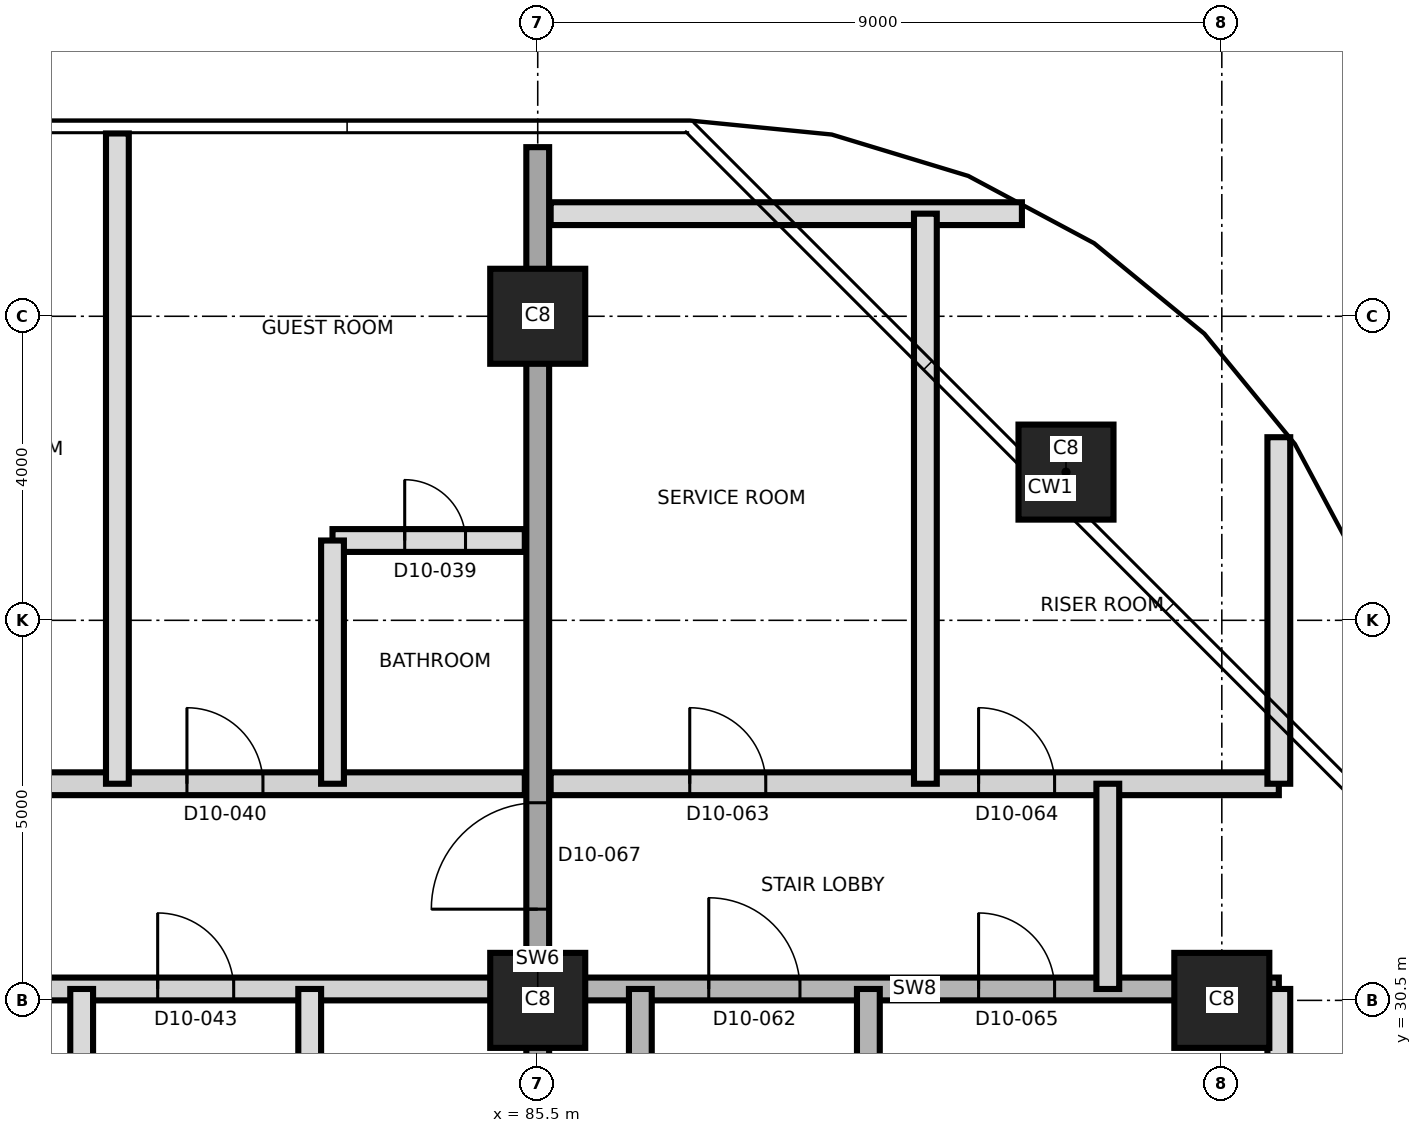
"""IFC4 building model, lengths in metres.
Left out: names, types, materials, properties, quantities, classifications, styles, units other than length and angle.
Written with IfcOpenShell. Run it as: python <this file> out.ifc"""

import sys

from ifc_helpers import new_model, si_unit, direction, frame, frame_2d, origin, origin_2d, place, context, subcontext, project, spatial, rectangle, extrude, element, fill, save


model = new_model("IFC4")
c1 = context("Model", 3, precision=1e-05, world=origin(), true_north=direction((0.0, 1.0)))
c2 = subcontext(c1, "Body", "Model", "MODEL_VIEW")
j1 = project(units=[si_unit("LENGTHUNIT", "METRE"), si_unit("PLANEANGLEUNIT", "RADIAN")], contexts=[c1])
p1 = place(None, origin())
s1 = spatial("IfcSite", under=j1, at=p1, CompositionType="ELEMENT")
p2 = place(p1, origin())
s2 = spatial("IfcBuilding", under=s1, at=p2, CompositionType="ELEMENT")
p3 = place(p2, frame((0.0, 0.0, 116.7)))
s3 = spatial("IfcBuildingStorey", under=s2, at=p3, CompositionType="ELEMENT", Elevation=116.7)
for number, where, z_axis, x_axis in (
    (1, (85.5, 30.5, 0.0), (0.0, 0.0, 1.0), (1.0, 0.0, 0.0)),
    (2, (94.5, 30.5, 0.0), (0.0, 0.0, 1.0), (1.0, 0.0, 0.0)),
    (3, (92.45, 37.45, 0.0), (0.0, 0.0, 1.0), (1.0, 0.0, 0.0)),
    (4, (85.5, 39.5, 0.0), (0.0, 0.0, 1.0), (1.0, 0.0, 0.0)),
):
    element("IfcColumn", number, at=place(p3, frame(where, z_axis=z_axis, x_axis=x_axis)), inside=s3, PredefinedType="COLUMN", context=c2, shape_type="SweptSolid", body=[
        extrude(rectangle(XDim=1.25, YDim=1.25, at=origin_2d()), origin(), (0.0, 0.0, 1.0), 3.7),
    ])
p4 = place(p3, frame((85.5, 19.275, 0.0), z_axis=(0.0, 0.0, 1.0), x_axis=(0.0, 1.0, 0.0)))
e5 = element("IfcWall", 5, at=p4, inside=s3, PredefinedType="SHEAR", context=c2, shape_type="SweptSolid", body=[
    extrude(rectangle(XDim=22.45, YDim=0.3, at=frame_2d((11.225, 0.0))), origin(), (0.0, 0.0, 1.0), 3.7),
])
p5 = place(p4, frame((12.425, 0.0, 0.0)))
e6 = element("IfcOpeningElement", 6, at=p5, cuts=e5, PredefinedType="OPENING", context=c2, shape_type="SweptSolid", body=[
    extrude(rectangle(XDim=1.4, YDim=2.1, at=frame_2d((0.7, 1.05))), frame((0.0, 0.16, 0.0), z_axis=(0.0, -1.0, 0.0), x_axis=(1.0, 0.0, 0.0)), (0.0, 0.0, 1.0), 0.32),
])
p6 = place(p3, frame((58.8, 30.65, 0.0), z_axis=(0.0, 0.0, 1.0), x_axis=(1.0, 0.0, 0.0)))
e7 = element("IfcWall", 7, at=p6, inside=s3, PredefinedType="PARTITIONING", context=c2, shape_type="SweptSolid", body=[
    extrude(rectangle(XDim=26.53, YDim=0.3, at=frame_2d((13.265, 0.0))), origin(), (0.0, 0.0, 1.0), 3.4),
])
p7 = place(p6, frame((0.835, 0.0, 0.0)))
e8 = element("IfcOpeningElement", 8, at=p7, cuts=e7, PredefinedType="OPENING", context=c2, shape_type="SweptSolid", body=[
    extrude(rectangle(XDim=1.2, YDim=2.1, at=frame_2d((0.6, 1.05))), frame((0.0, 0.16, 0.0), z_axis=(0.0, -1.0, 0.0), x_axis=(1.0, 0.0, 0.0)), (0.0, 0.0, 1.0), 0.32),
])
p8 = place(p6, frame((4.085, 0.0, 0.0)))
e9 = element("IfcOpeningElement", 9, at=p8, cuts=e7, PredefinedType="OPENING", context=c2, shape_type="SweptSolid", body=[
    extrude(rectangle(XDim=1.0, YDim=2.1, at=frame_2d((0.5, 1.05))), frame((0.0, 0.16, 0.0), z_axis=(0.0, -1.0, 0.0), x_axis=(1.0, 0.0, 0.0)), (0.0, 0.0, 1.0), 0.32),
])
p9 = place(p6, frame((12.7, 0.0, 0.0)))
e10 = element("IfcOpeningElement", 10, at=p9, cuts=e7, PredefinedType="OPENING", context=c2, shape_type="SweptSolid", body=[
    extrude(rectangle(XDim=1.0, YDim=2.4, at=frame_2d((0.5, 1.2))), frame((0.0, 0.16, 0.0), z_axis=(0.0, -1.0, 0.0), x_axis=(1.0, 0.0, 0.0)), (0.0, 0.0, 1.0), 0.32),
])
p10 = place(p6, frame((21.7, 0.0, 0.0)))
e11 = element("IfcOpeningElement", 11, at=p10, cuts=e7, PredefinedType="OPENING", context=c2, shape_type="SweptSolid", body=[
    extrude(rectangle(XDim=1.0, YDim=2.4, at=frame_2d((0.5, 1.2))), frame((0.0, 0.16, 0.0), z_axis=(0.0, -1.0, 0.0), x_axis=(1.0, 0.0, 0.0)), (0.0, 0.0, 1.0), 0.32),
])
p11 = place(p3, frame((85.67, 30.65, 0.0), z_axis=(0.0, 0.0, 1.0), x_axis=(1.0, 0.0, 0.0)))
e12 = element("IfcWall", 12, at=p11, inside=s3, PredefinedType="SHEAR", context=c2, shape_type="SweptSolid", body=[
    extrude(rectangle(XDim=9.58, YDim=0.3, at=frame_2d((4.79, 0.0))), origin(), (0.0, 0.0, 1.0), 3.4),
])
p12 = place(p11, frame((2.08, 0.0, 0.0)))
e13 = element("IfcOpeningElement", 13, at=p12, cuts=e12, PredefinedType="OPENING", context=c2, shape_type="SweptSolid", body=[
    extrude(rectangle(XDim=1.2, YDim=2.1, at=frame_2d((0.6, 1.05))), frame((0.0, 0.16, 0.0), z_axis=(0.0, -1.0, 0.0), x_axis=(1.0, 0.0, 0.0)), (0.0, 0.0, 1.0), 0.32),
])
p13 = place(p11, frame((5.63, 0.0, 0.0)))
e14 = element("IfcOpeningElement", 14, at=p13, cuts=e12, PredefinedType="OPENING", context=c2, shape_type="SweptSolid", body=[
    extrude(rectangle(XDim=1.0, YDim=2.1, at=frame_2d((0.5, 1.05))), frame((0.0, 0.16, 0.0), z_axis=(0.0, -1.0, 0.0), x_axis=(1.0, 0.0, 0.0)), (0.0, 0.0, 1.0), 0.32),
])
p14 = place(p3, frame((58.8, 33.35, 0.0), z_axis=(0.0, 0.0, 1.0), x_axis=(1.0, 0.0, 0.0)))
e15 = element("IfcWall", 15, at=p14, inside=s3, PredefinedType="PARTITIONING", context=c2, shape_type="SweptSolid", body=[
    extrude(rectangle(XDim=26.53, YDim=0.3, at=frame_2d((13.265, 0.0))), origin(), (0.0, 0.0, 1.0), 3.4),
])
p15 = place(p14, frame((0.85, 0.0, 0.0)))
e16 = element("IfcOpeningElement", 16, at=p15, cuts=e15, PredefinedType="OPENING", context=c2, shape_type="SweptSolid", body=[
    extrude(rectangle(XDim=1.0, YDim=2.1, at=frame_2d((0.5, 1.05))), frame((0.0, 0.16, 0.0), z_axis=(0.0, -1.0, 0.0), x_axis=(1.0, 0.0, 0.0)), (0.0, 0.0, 1.0), 0.32),
])
p16 = place(p14, frame((6.7, 0.0, 0.0)))
e17 = element("IfcOpeningElement", 17, at=p16, cuts=e15, PredefinedType="OPENING", context=c2, shape_type="SweptSolid", body=[
    extrude(rectangle(XDim=1.0, YDim=2.1, at=frame_2d((0.5, 1.05))), frame((0.0, 0.16, 0.0), z_axis=(0.0, -1.0, 0.0), x_axis=(1.0, 0.0, 0.0)), (0.0, 0.0, 1.0), 0.32),
])
p17 = place(p14, frame((9.55, 0.0, 0.0)))
e18 = element("IfcOpeningElement", 18, at=p17, cuts=e15, PredefinedType="OPENING", context=c2, shape_type="SweptSolid", body=[
    extrude(rectangle(XDim=1.0, YDim=2.1, at=frame_2d((0.5, 1.05))), frame((0.0, 0.16, 0.0), z_axis=(0.0, -1.0, 0.0), x_axis=(1.0, 0.0, 0.0)), (0.0, 0.0, 1.0), 0.32),
])
p18 = place(p14, frame((15.4, 0.0, 0.0)))
e19 = element("IfcOpeningElement", 19, at=p18, cuts=e15, PredefinedType="OPENING", context=c2, shape_type="SweptSolid", body=[
    extrude(rectangle(XDim=1.0, YDim=2.1, at=frame_2d((0.5, 1.05))), frame((0.0, 0.16, 0.0), z_axis=(0.0, -1.0, 0.0), x_axis=(1.0, 0.0, 0.0)), (0.0, 0.0, 1.0), 0.32),
])
p19 = place(p14, frame((18.835, 0.0, 0.0)))
e20 = element("IfcOpeningElement", 20, at=p19, cuts=e15, PredefinedType="OPENING", context=c2, shape_type="SweptSolid", body=[
    extrude(rectangle(XDim=1.2, YDim=2.1, at=frame_2d((0.6, 1.05))), frame((0.0, 0.16, 0.0), z_axis=(0.0, -1.0, 0.0), x_axis=(1.0, 0.0, 0.0)), (0.0, 0.0, 1.0), 0.32),
])
p20 = place(p14, frame((22.085, 0.0, 0.0)))
e21 = element("IfcOpeningElement", 21, at=p20, cuts=e15, PredefinedType="OPENING", context=c2, shape_type="SweptSolid", body=[
    extrude(rectangle(XDim=1.0, YDim=2.1, at=frame_2d((0.5, 1.05))), frame((0.0, 0.16, 0.0), z_axis=(0.0, -1.0, 0.0), x_axis=(1.0, 0.0, 0.0)), (0.0, 0.0, 1.0), 0.32),
])
p21 = place(p3, frame((85.67, 33.35, 0.0), z_axis=(0.0, 0.0, 1.0), x_axis=(1.0, 0.0, 0.0)))
e22 = element("IfcWall", 22, at=p21, inside=s3, PredefinedType="PARTITIONING", context=c2, shape_type="SweptSolid", body=[
    extrude(rectangle(XDim=9.58, YDim=0.3, at=frame_2d((4.79, 0.0))), origin(), (0.0, 0.0, 1.0), 3.4),
])
p22 = place(p21, frame((1.83, 0.0, 0.0)))
e23 = element("IfcOpeningElement", 23, at=p22, cuts=e22, PredefinedType="OPENING", context=c2, shape_type="SweptSolid", body=[
    extrude(rectangle(XDim=1.0, YDim=2.1, at=frame_2d((0.5, 1.05))), frame((0.0, 0.16, 0.0), z_axis=(0.0, -1.0, 0.0), x_axis=(1.0, 0.0, 0.0)), (0.0, 0.0, 1.0), 0.32),
])
p23 = place(p21, frame((5.63, 0.0, 0.0)))
e24 = element("IfcOpeningElement", 24, at=p23, cuts=e22, PredefinedType="OPENING", context=c2, shape_type="SweptSolid", body=[
    extrude(rectangle(XDim=1.0, YDim=2.1, at=frame_2d((0.5, 1.05))), frame((0.0, 0.16, 0.0), z_axis=(0.0, -1.0, 0.0), x_axis=(1.0, 0.0, 0.0)), (0.0, 0.0, 1.0), 0.32),
])
p24 = place(p3, frame((82.8, 36.55, 0.0), z_axis=(0.0, 0.0, 1.0), x_axis=(1.0, 0.0, 0.0)))
e25 = element("IfcWall", 25, at=p24, inside=s3, PredefinedType="PARTITIONING", context=c2, shape_type="SweptSolid", body=[
    extrude(rectangle(XDim=2.53, YDim=0.3, at=frame_2d((1.265, 0.0))), origin(), (0.0, 0.0, 1.0), 3.4),
])
p25 = place(p24, frame((0.95, 0.0, 0.0)))
e26 = element("IfcOpeningElement", 26, at=p25, cuts=e25, PredefinedType="OPENING", context=c2, shape_type="SweptSolid", body=[
    extrude(rectangle(XDim=0.8, YDim=2.1, at=frame_2d((0.4, 1.05))), frame((0.0, 0.16, 0.0), z_axis=(0.0, -1.0, 0.0), x_axis=(1.0, 0.0, 0.0)), (0.0, 0.0, 1.0), 0.32),
])
p26 = place(p3, frame((85.67, 40.85, 0.0), z_axis=(0.0, 0.0, 1.0), x_axis=(1.0, 0.0, 0.0)))
e27 = element("IfcWall", 27, at=p26, inside=s3, PredefinedType="PARTITIONING", context=c2, shape_type="SweptSolid", body=[
    extrude(rectangle(XDim=6.2, YDim=0.3, at=frame_2d((3.1, 0.0))), origin(), (0.0, 0.0, 1.0), 3.4),
])
p27 = place(p3, frame((79.5, 27.35, 0.0), z_axis=(0.0, 0.0, 1.0), x_axis=(0.0, 1.0, 0.0)))
e28 = element("IfcWall", 28, at=p27, inside=s3, PredefinedType="PARTITIONING", context=c2, shape_type="SweptSolid", body=[
    extrude(rectangle(XDim=3.3, YDim=0.3, at=frame_2d((1.65, 0.0))), origin(), (0.0, 0.0, 1.0), 3.4),
])
p28 = place(p3, frame((79.97, 33.35, 0.0), z_axis=(0.0, 0.0, 1.0), x_axis=(0.0, 1.0, 0.0)))
e29 = element("IfcWall", 29, at=p28, inside=s3, PredefinedType="PARTITIONING", context=c2, shape_type="SweptSolid", body=[
    extrude(rectangle(XDim=8.555, YDim=0.3, at=frame_2d((4.277, 0.0))), origin(), (0.0, 0.0, 1.0), 3.4),
])
p29 = place(p3, frame((82.5, 27.35, 0.0), z_axis=(0.0, 0.0, 1.0), x_axis=(0.0, 1.0, 0.0)))
e30 = element("IfcWall", 30, at=p29, inside=s3, PredefinedType="PARTITIONING", context=c2, shape_type="SweptSolid", body=[
    extrude(rectangle(XDim=3.3, YDim=0.3, at=frame_2d((1.65, 0.0))), origin(), (0.0, 0.0, 1.0), 3.4),
])
p30 = place(p3, frame((82.8, 33.35, 0.0), z_axis=(0.0, 0.0, 1.0), x_axis=(0.0, 1.0, 0.0)))
e31 = element("IfcWall", 31, at=p30, inside=s3, PredefinedType="PARTITIONING", context=c2, shape_type="SweptSolid", body=[
    extrude(rectangle(XDim=3.2, YDim=0.3, at=frame_2d((1.6, 0.0))), origin(), (0.0, 0.0, 1.0), 3.4),
])
for number, where, z_axis, x_axis in (
    (32, (86.85, 21.8, 0.0), (0.0, 0.0, 1.0), (0.0, 1.0, 0.0)),
    (33, (89.85, 21.8, 0.0), (0.0, 0.0, 1.0), (0.0, 1.0, 0.0)),
):
    element("IfcWall", number, at=place(p3, frame(where, z_axis=z_axis, x_axis=x_axis)), inside=s3, PredefinedType="SHEAR", context=c2, shape_type="SweptSolid", body=[
        extrude(rectangle(XDim=8.85, YDim=0.3, at=frame_2d((4.425, 0.0))), origin(), (0.0, 0.0, 1.0), 3.4),
    ])
p31 = place(p3, frame((90.6, 33.35, 0.0), z_axis=(0.0, 0.0, 1.0), x_axis=(0.0, 1.0, 0.0)))
e34 = element("IfcWall", 34, at=p31, inside=s3, PredefinedType="PARTITIONING", context=c2, shape_type="SweptSolid", body=[
    extrude(rectangle(XDim=7.5, YDim=0.3, at=frame_2d((3.75, 0.0))), origin(), (0.0, 0.0, 1.0), 3.4),
])
p32 = place(p3, frame((93.0, 30.65, 0.0), z_axis=(0.0, 0.0, 1.0), x_axis=(0.0, 1.0, 0.0)))
e35 = element("IfcWall", 35, at=p32, inside=s3, PredefinedType="PARTITIONING", context=c2, shape_type="SweptSolid", body=[
    extrude(rectangle(XDim=2.7, YDim=0.3, at=frame_2d((1.35, 0.0))), origin(), (0.0, 0.0, 1.0), 3.4),
])
p33 = place(p3, frame((95.25, 23.091, 0.0), z_axis=(0.0, 0.0, 1.0), x_axis=(0.0, 1.0, 0.0)))
e36 = element("IfcWall", 36, at=p33, inside=s3, PredefinedType="PARTITIONING", context=c2, shape_type="SweptSolid", body=[
    extrude(rectangle(XDim=7.559, YDim=0.3, at=frame_2d((3.779, 0.0))), origin(), (0.0, 0.0, 1.0), 3.4),
])
p34 = place(p3, frame((95.25, 33.35, 0.0), z_axis=(0.0, 0.0, 1.0), x_axis=(0.0, 1.0, 0.0)))
e37 = element("IfcWall", 37, at=p34, inside=s3, PredefinedType="PARTITIONING", context=c2, shape_type="SweptSolid", body=[
    extrude(rectangle(XDim=4.559, YDim=0.3, at=frame_2d((2.279, 0.0))), origin(), (0.0, 0.0, 1.0), 3.4),
])
p35 = place(p25, origin())
e38 = element("IfcDoor", 38, at=p35, inside=s3, OperationType="SINGLE_SWING_RIGHT", PredefinedType="DOOR", context=c2, shape_type="SweptSolid", body=[
    extrude(rectangle(XDim=0.8, YDim=2.1, at=frame_2d((0.4, 1.05))), frame((0.0, 0.025, 0.0), z_axis=(0.0, -1.0, 0.0), x_axis=(1.0, 0.0, 0.0)), (0.0, 0.0, 1.0), 0.05),
])
fill(e26, e38)
p36 = place(p20, origin())
e39 = element("IfcDoor", 39, at=p36, inside=s3, OperationType="SINGLE_SWING_LEFT", PredefinedType="DOOR", context=c2, shape_type="SweptSolid", body=[
    extrude(rectangle(XDim=1.0, YDim=2.1, at=frame_2d((0.5, 1.05))), frame((0.0, 0.025, 0.0), z_axis=(0.0, -1.0, 0.0), x_axis=(1.0, 0.0, 0.0)), (0.0, 0.0, 1.0), 0.05),
])
fill(e21, e39)
p37 = place(p10, origin())
e40 = element("IfcDoor", 40, at=p37, inside=s3, OperationType="SINGLE_SWING_LEFT", PredefinedType="DOOR", context=c2, shape_type="SweptSolid", body=[
    extrude(rectangle(XDim=1.0, YDim=2.4, at=frame_2d((0.5, 1.2))), frame((0.0, 0.025, 0.0), z_axis=(0.0, -1.0, 0.0), x_axis=(1.0, 0.0, 0.0)), (0.0, 0.0, 1.0), 0.05),
])
fill(e11, e40)
p38 = place(p12, origin())
e41 = element("IfcDoor", 41, at=p38, inside=s3, OperationType="SINGLE_SWING_LEFT", PredefinedType="DOOR", context=c2, shape_type="SweptSolid", body=[
    extrude(rectangle(XDim=1.2, YDim=2.1, at=frame_2d((0.6, 1.05))), frame((0.0, 0.025, 0.0), z_axis=(0.0, -1.0, 0.0), x_axis=(1.0, 0.0, 0.0)), (0.0, 0.0, 1.0), 0.05),
])
fill(e13, e41)
p39 = place(p22, origin())
e42 = element("IfcDoor", 42, at=p39, inside=s3, OperationType="SINGLE_SWING_LEFT", PredefinedType="DOOR", context=c2, shape_type="SweptSolid", body=[
    extrude(rectangle(XDim=1.0, YDim=2.1, at=frame_2d((0.5, 1.05))), frame((0.0, 0.025, 0.0), z_axis=(0.0, -1.0, 0.0), x_axis=(1.0, 0.0, 0.0)), (0.0, 0.0, 1.0), 0.05),
])
fill(e23, e42)
p40 = place(p23, origin())
e43 = element("IfcDoor", 43, at=p40, inside=s3, OperationType="SINGLE_SWING_RIGHT", PredefinedType="DOOR", context=c2, shape_type="SweptSolid", body=[
    extrude(rectangle(XDim=1.0, YDim=2.1, at=frame_2d((0.5, 1.05))), frame((0.0, 0.025, 0.0), z_axis=(0.0, -1.0, 0.0), x_axis=(1.0, 0.0, 0.0)), (0.0, 0.0, 1.0), 0.05),
])
fill(e24, e43)
p41 = place(p13, origin())
e44 = element("IfcDoor", 44, at=p41, inside=s3, OperationType="SINGLE_SWING_LEFT", PredefinedType="DOOR", context=c2, shape_type="SweptSolid", body=[
    extrude(rectangle(XDim=1.0, YDim=2.1, at=frame_2d((0.5, 1.05))), frame((0.0, 0.025, 0.0), z_axis=(0.0, -1.0, 0.0), x_axis=(1.0, 0.0, 0.0)), (0.0, 0.0, 1.0), 0.05),
])
fill(e14, e44)
p42 = place(p5, origin())
e45 = element("IfcDoor", 45, at=p42, inside=s3, OperationType="SINGLE_SWING_RIGHT", PredefinedType="DOOR", context=c2, shape_type="SweptSolid", body=[
    extrude(rectangle(XDim=1.4, YDim=2.1, at=frame_2d((0.7, 1.05))), frame((0.0, 0.025, 0.0), z_axis=(0.0, -1.0, 0.0), x_axis=(1.0, 0.0, 0.0)), (0.0, 0.0, 1.0), 0.05),
])
fill(e6, e45)
save(model, sys.argv[1])
